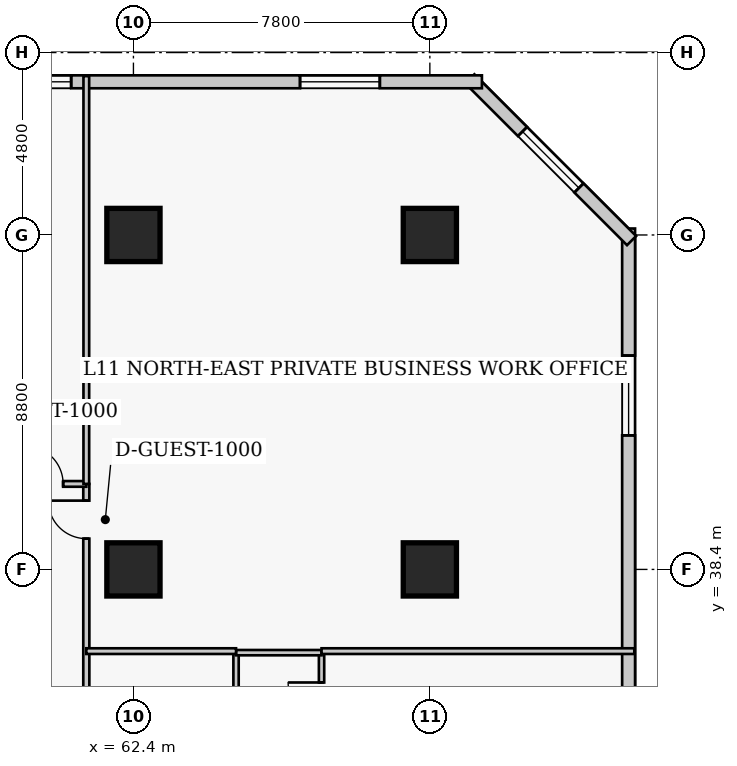
"""IFC4 building model, lengths in metres.
Left out: names, types, materials, properties, quantities, classifications, styles, units other than length and angle.
Written with IfcOpenShell. Run it as: python <this file> out.ifc"""

import sys

from ifc_helpers import new_model, si_unit, direction, frame, frame_2d, origin, origin_2d, place, context, subcontext, project, spatial, rectangle, extrude, element, fill, save


model = new_model("IFC4")
c1 = context("Model", 3, precision=1e-05, world=origin(), true_north=direction((0.0, 1.0)))
c2 = subcontext(c1, "Body", "Model", "MODEL_VIEW")
j1 = project(units=[si_unit("LENGTHUNIT", "METRE"), si_unit("PLANEANGLEUNIT", "RADIAN")], contexts=[c1])
p1 = place(None, origin())
s1 = spatial("IfcSite", under=j1, at=p1, CompositionType="ELEMENT")
p2 = place(p1, origin())
s2 = spatial("IfcBuilding", under=s1, at=p2, CompositionType="ELEMENT")
p3 = place(p2, frame((0.0, 0.0, 48.8)))
s3 = spatial("IfcBuildingStorey", under=s2, at=p3, CompositionType="ELEMENT", Elevation=48.8)
for number, where, z_axis, x_axis in (
    (1, (62.4, 38.4, 0.0), (0.0, 0.0, 1.0), (1.0, 0.0, 0.0)),
    (2, (62.4, 47.2, 0.0), (0.0, 0.0, 1.0), (1.0, 0.0, 0.0)),
    (3, (70.2, 38.4, 0.0), (0.0, 0.0, 1.0), (1.0, 0.0, 0.0)),
    (4, (70.2, 47.2, 0.0), (0.0, 0.0, 1.0), (1.0, 0.0, 0.0)),
):
    element("IfcColumn", number, at=place(p3, frame(where, z_axis=z_axis, x_axis=x_axis)), inside=s3, PredefinedType="COLUMN", context=c2, shape_type="SweptSolid", body=[
        extrude(rectangle(XDim=1.4, YDim=1.4, at=origin_2d()), origin(), (0.0, 0.0, 1.0), 3.8),
    ])
p4 = place(p3, frame((75.43, 12.23, 0.0), z_axis=(0.0, 0.0, 1.0), x_axis=(0.0, 1.0, 0.0)))
e5 = element("IfcWall", 5, at=p4, inside=s3, PredefinedType="SOLIDWALL", context=c2, shape_type="SweptSolid", body=[
    extrude(rectangle(XDim=35.14, YDim=0.34, at=frame_2d((17.57, 0.0))), origin(), (0.0, 0.0, 1.0), 3.54),
])
p5 = place(p4, frame((3.343, 0.0, 0.85)))
e6 = element("IfcOpeningElement", 6, at=p5, cuts=e5, PredefinedType="OPENING", context=c2, shape_type="SweptSolid", body=[
    extrude(rectangle(XDim=2.1, YDim=1.85, at=frame_2d((1.05, 0.925))), frame((0.0, 0.18, 0.0), z_axis=(0.0, -1.0, 0.0), x_axis=(1.0, 0.0, 0.0)), (0.0, 0.0, 1.0), 0.36),
])
p6 = place(p4, frame((12.127, 0.0, 0.85)))
e7 = element("IfcOpeningElement", 7, at=p6, cuts=e5, PredefinedType="OPENING", context=c2, shape_type="SweptSolid", body=[
    extrude(rectangle(XDim=2.1, YDim=1.85, at=frame_2d((1.05, 0.925))), frame((0.0, 0.18, 0.0), z_axis=(0.0, -1.0, 0.0), x_axis=(1.0, 0.0, 0.0)), (0.0, 0.0, 1.0), 0.36),
])
p7 = place(p4, frame((20.913, 0.0, 0.85)))
e8 = element("IfcOpeningElement", 8, at=p7, cuts=e5, PredefinedType="OPENING", context=c2, shape_type="SweptSolid", body=[
    extrude(rectangle(XDim=2.1, YDim=1.85, at=frame_2d((1.05, 0.925))), frame((0.0, 0.18, 0.0), z_axis=(0.0, -1.0, 0.0), x_axis=(1.0, 0.0, 0.0)), (0.0, 0.0, 1.0), 0.36),
])
p8 = place(p4, frame((29.698, 0.0, 0.85)))
e9 = element("IfcOpeningElement", 9, at=p8, cuts=e5, PredefinedType="OPENING", context=c2, shape_type="SweptSolid", body=[
    extrude(rectangle(XDim=2.1, YDim=1.85, at=frame_2d((1.05, 0.925))), frame((0.0, 0.18, 0.0), z_axis=(0.0, -1.0, 0.0), x_axis=(1.0, 0.0, 0.0)), (0.0, 0.0, 1.0), 0.36),
])
p9 = place(p3, frame((75.508, 47.052, 0.0), z_axis=(0.0, 0.0, 1.0), x_axis=(-0.707106781187, 0.707106781187, 0.0)))
e10 = element("IfcWall", 10, at=p9, inside=s3, PredefinedType="SOLIDWALL", context=c2, shape_type="SweptSolid", body=[
    extrude(rectangle(XDim=6.02, YDim=0.34, at=frame_2d((3.01, 0.0))), origin(), (0.0, 0.0, 1.0), 3.54),
])
p10 = place(p9, frame((1.96, 0.0, 0.85)))
e11 = element("IfcOpeningElement", 11, at=p10, cuts=e10, PredefinedType="OPENING", context=c2, shape_type="SweptSolid", body=[
    extrude(rectangle(XDim=2.1, YDim=1.85, at=frame_2d((1.05, 0.925))), frame((0.0, 0.18, 0.0), z_axis=(0.0, -1.0, 0.0), x_axis=(1.0, 0.0, 0.0)), (0.0, 0.0, 1.0), 0.36),
])
p11 = place(p3, frame((71.57, 51.23, 0.0), z_axis=(0.0, 0.0, 1.0), x_axis=(-1.0, 0.0, 0.0)))
e12 = element("IfcWall", 12, at=p11, inside=s3, PredefinedType="SOLIDWALL", context=c2, shape_type="SweptSolid", body=[
    extrude(rectangle(XDim=29.89, YDim=0.34, at=frame_2d((14.945, 0.0))), origin(), (0.0, 0.0, 1.0), 3.54),
])
p12 = place(p11, frame((2.686, 0.0, 0.85)))
e13 = element("IfcOpeningElement", 13, at=p12, cuts=e12, PredefinedType="OPENING", context=c2, shape_type="SweptSolid", body=[
    extrude(rectangle(XDim=2.1, YDim=1.85, at=frame_2d((1.05, 0.925))), frame((0.0, 0.18, 0.0), z_axis=(0.0, -1.0, 0.0), x_axis=(1.0, 0.0, 0.0)), (0.0, 0.0, 1.0), 0.36),
])
p13 = place(p11, frame((10.809, 0.0, 0.85)))
e14 = element("IfcOpeningElement", 14, at=p13, cuts=e12, PredefinedType="OPENING", context=c2, shape_type="SweptSolid", body=[
    extrude(rectangle(XDim=2.1, YDim=1.85, at=frame_2d((1.05, 0.925))), frame((0.0, 0.18, 0.0), z_axis=(0.0, -1.0, 0.0), x_axis=(1.0, 0.0, 0.0)), (0.0, 0.0, 1.0), 0.36),
])
p14 = place(p11, frame((17.631, 0.0, 0.85)))
e15 = element("IfcOpeningElement", 15, at=p14, cuts=e12, PredefinedType="OPENING", context=c2, shape_type="SweptSolid", body=[
    extrude(rectangle(XDim=2.1, YDim=1.85, at=frame_2d((1.05, 0.925))), frame((0.0, 0.18, 0.0), z_axis=(0.0, -1.0, 0.0), x_axis=(1.0, 0.0, 0.0)), (0.0, 0.0, 1.0), 0.36),
])
p15 = place(p11, frame((25.104, 0.0, 0.85)))
e16 = element("IfcOpeningElement", 16, at=p15, cuts=e12, PredefinedType="OPENING", context=c2, shape_type="SweptSolid", body=[
    extrude(rectangle(XDim=2.1, YDim=1.85, at=frame_2d((1.05, 0.925))), frame((0.0, 0.18, 0.0), z_axis=(0.0, -1.0, 0.0), x_axis=(1.0, 0.0, 0.0)), (0.0, 0.0, 1.0), 0.36),
])
p16 = place(p3, frame((61.16, 10.25, 0.0), z_axis=(0.0, 0.0, 1.0), x_axis=(0.0, 1.0, 0.0)))
e17 = element("IfcWall", 17, at=p16, inside=s3, PredefinedType="PARTITIONING", context=c2, shape_type="SweptSolid", body=[
    extrude(rectangle(XDim=30.4, YDim=0.16, at=frame_2d((15.2, 0.0))), origin(), (0.0, 0.0, 1.0), 3.54),
])
p17 = place(p16, frame((4.4, 0.0, 0.0)))
e18 = element("IfcOpeningElement", 18, at=p17, cuts=e17, PredefinedType="OPENING", context=c2, shape_type="SweptSolid", body=[
    extrude(rectangle(XDim=0.95, YDim=2.1, at=frame_2d((0.475, 1.05))), frame((0.0, 0.09, 0.0), z_axis=(0.0, -1.0, 0.0), x_axis=(1.0, 0.0, 0.0)), (0.0, 0.0, 1.0), 0.18),
])
p18 = place(p16, frame((13.675, 0.0, 0.0)))
e19 = element("IfcOpeningElement", 19, at=p18, cuts=e17, PredefinedType="OPENING", context=c2, shape_type="SweptSolid", body=[
    extrude(rectangle(XDim=0.95, YDim=2.1, at=frame_2d((0.475, 1.05))), frame((0.0, 0.09, 0.0), z_axis=(0.0, -1.0, 0.0), x_axis=(1.0, 0.0, 0.0)), (0.0, 0.0, 1.0), 0.18),
])
p19 = place(p16, frame((21.8, 0.0, 0.0)))
e20 = element("IfcOpeningElement", 20, at=p19, cuts=e17, PredefinedType="OPENING", context=c2, shape_type="SweptSolid", body=[
    extrude(rectangle(XDim=0.95, YDim=2.1, at=frame_2d((0.475, 1.05))), frame((0.0, 0.09, 0.0), z_axis=(0.0, -1.0, 0.0), x_axis=(1.0, 0.0, 0.0)), (0.0, 0.0, 1.0), 0.18),
])
p20 = place(p16, frame((28.96, 0.0, 0.0)))
e21 = element("IfcOpeningElement", 21, at=p20, cuts=e17, PredefinedType="OPENING", context=c2, shape_type="SweptSolid", body=[
    extrude(rectangle(XDim=1.0, YDim=2.15, at=frame_2d((0.5, 1.075))), frame((0.0, 0.09, 0.0), z_axis=(0.0, -1.0, 0.0), x_axis=(1.0, 0.0, 0.0)), (0.0, 0.0, 1.0), 0.18),
])
p21 = place(p3, frame((56.8, 40.65, 0.0), z_axis=(0.0, 0.0, 1.0), x_axis=(1.0, 0.0, 0.0)))
e22 = element("IfcWall", 22, at=p21, inside=s3, PredefinedType="PARTITIONING", context=c2, shape_type="SweptSolid", body=[
    extrude(rectangle(XDim=4.36, YDim=0.15, at=frame_2d((2.18, 0.0))), origin(), (0.0, 0.0, 1.0), 3.54),
])
p22 = place(p21, frame((2.75, 0.0, 0.0)))
e23 = element("IfcOpeningElement", 23, at=p22, cuts=e22, PredefinedType="OPENING", context=c2, shape_type="SweptSolid", body=[
    extrude(rectangle(XDim=1.0, YDim=2.15, at=frame_2d((0.5, 1.075))), frame((0.0, 0.085, 0.0), z_axis=(0.0, -1.0, 0.0), x_axis=(1.0, 0.0, 0.0)), (0.0, 0.0, 1.0), 0.17),
])
p23 = place(p3, frame((61.16, 40.65, 0.0), z_axis=(0.0, 0.0, 1.0), x_axis=(0.0, 1.0, 0.0)))
e24 = element("IfcWall", 24, at=p23, inside=s3, PredefinedType="PARTITIONING", context=c2, shape_type="SweptSolid", body=[
    extrude(rectangle(XDim=10.73, YDim=0.15, at=frame_2d((5.365, 0.0))), origin(), (0.0, 0.0, 1.0), 3.54),
])
p24 = place(p3, frame((65.1, 33.76, 0.0), z_axis=(0.0, 0.0, 1.0), x_axis=(0.0, 1.0, 0.0)))
e25 = element("IfcWall", 25, at=p24, inside=s3, PredefinedType="PLUMBINGWALL", context=c2, shape_type="SweptSolid", body=[
    extrude(rectangle(XDim=2.45, YDim=0.14, at=frame_2d((1.225, 0.0))), origin(), (0.0, 0.0, 1.0), 3.54),
])
p25 = place(p3, frame((67.35, 33.76, 0.0), z_axis=(0.0, 0.0, 1.0), x_axis=(0.0, 1.0, 0.0)))
e26 = element("IfcWall", 26, at=p25, inside=s3, PredefinedType="PLUMBINGWALL", context=c2, shape_type="SweptSolid", body=[
    extrude(rectangle(XDim=2.45, YDim=0.14, at=frame_2d((1.225, 0.0))), origin(), (0.0, 0.0, 1.0), 3.54),
])
p26 = place(p25, frame((0.785, 0.0, 0.0)))
e27 = element("IfcOpeningElement", 27, at=p26, cuts=e26, PredefinedType="OPENING", context=c2, shape_type="SweptSolid", body=[
    extrude(rectangle(XDim=0.88, YDim=2.05, at=frame_2d((0.44, 1.025))), frame((0.0, 0.08, 0.0), z_axis=(0.0, -1.0, 0.0), x_axis=(1.0, 0.0, 0.0)), (0.0, 0.0, 1.0), 0.16),
])
p27 = place(p3, frame((65.1, 36.21, 0.0), z_axis=(0.0, 0.0, 1.0), x_axis=(1.0, 0.0, 0.0)))
e28 = element("IfcWall", 28, at=p27, inside=s3, PredefinedType="PLUMBINGWALL", context=c2, shape_type="SweptSolid", body=[
    extrude(rectangle(XDim=2.25, YDim=0.14, at=frame_2d((1.125, 0.0))), origin(), (0.0, 0.0, 1.0), 3.54),
])
p28 = place(p3, frame((61.16, 36.25, 0.0), z_axis=(0.0, 0.0, 1.0), x_axis=(1.0, 0.0, 0.0)))
e29 = element("IfcWall", 29, at=p28, inside=s3, PredefinedType="PARTITIONING", context=c2, shape_type="SweptSolid", body=[
    extrude(rectangle(XDim=3.94, YDim=0.15, at=frame_2d((1.97, 0.0))), origin(), (0.0, 0.0, 1.0), 3.54),
])
p29 = place(p3, frame((67.35, 36.25, 0.0), z_axis=(0.0, 0.0, 1.0), x_axis=(1.0, 0.0, 0.0)))
e30 = element("IfcWall", 30, at=p29, inside=s3, PredefinedType="PARTITIONING", context=c2, shape_type="SweptSolid", body=[
    extrude(rectangle(XDim=8.23, YDim=0.15, at=frame_2d((4.115, 0.0))), origin(), (0.0, 0.0, 1.0), 3.54),
])
p30 = place(p8, origin())
e31 = element("IfcWindow", 31, at=p30, inside=s3, PartitioningType="SINGLE_PANEL", PredefinedType="WINDOW", context=c2, shape_type="SweptSolid", body=[
    extrude(rectangle(XDim=2.1, YDim=1.85, at=frame_2d((1.05, 0.925))), frame((0.0, 0.03, 0.0), z_axis=(0.0, -1.0, 0.0), x_axis=(1.0, 0.0, 0.0)), (0.0, 0.0, 1.0), 0.06),
])
fill(e9, e31)
p31 = place(p10, origin())
e32 = element("IfcWindow", 32, at=p31, inside=s3, PartitioningType="SINGLE_PANEL", PredefinedType="WINDOW", context=c2, shape_type="SweptSolid", body=[
    extrude(rectangle(XDim=2.1, YDim=1.85, at=frame_2d((1.05, 0.925))), frame((0.0, 0.03, 0.0), z_axis=(0.0, -1.0, 0.0), x_axis=(1.0, 0.0, 0.0)), (0.0, 0.0, 1.0), 0.06),
])
fill(e11, e32)
p32 = place(p12, origin())
e33 = element("IfcWindow", 33, at=p32, inside=s3, PartitioningType="SINGLE_PANEL", PredefinedType="WINDOW", context=c2, shape_type="SweptSolid", body=[
    extrude(rectangle(XDim=2.1, YDim=1.85, at=frame_2d((1.05, 0.925))), frame((0.0, 0.03, 0.0), z_axis=(0.0, -1.0, 0.0), x_axis=(1.0, 0.0, 0.0)), (0.0, 0.0, 1.0), 0.06),
])
fill(e13, e33)
p33 = place(p13, origin())
e34 = element("IfcWindow", 34, at=p33, inside=s3, PartitioningType="SINGLE_PANEL", PredefinedType="WINDOW", context=c2, shape_type="SweptSolid", body=[
    extrude(rectangle(XDim=2.1, YDim=1.85, at=frame_2d((1.05, 0.925))), frame((0.0, 0.03, 0.0), z_axis=(0.0, -1.0, 0.0), x_axis=(1.0, 0.0, 0.0)), (0.0, 0.0, 1.0), 0.06),
])
fill(e14, e34)
p34 = place(p22, origin())
e35 = element("IfcDoor", 35, at=p34, inside=s3, OperationType="SINGLE_SWING_LEFT", PredefinedType="DOOR", context=c2, shape_type="SweptSolid", body=[
    extrude(rectangle(XDim=1.0, YDim=2.15, at=frame_2d((0.5, 1.075))), frame((0.0, 0.025, 0.0), z_axis=(0.0, -1.0, 0.0), x_axis=(1.0, 0.0, 0.0)), (0.0, 0.0, 1.0), 0.05),
])
fill(e23, e35)
p35 = place(p26, origin())
e36 = element("IfcDoor", 36, at=p35, inside=s3, OperationType="SINGLE_SWING_RIGHT", PredefinedType="DOOR", context=c2, shape_type="SweptSolid", body=[
    extrude(rectangle(XDim=0.88, YDim=2.05, at=frame_2d((0.44, 1.025))), frame((0.0, 0.025, 0.0), z_axis=(0.0, -1.0, 0.0), x_axis=(1.0, 0.0, 0.0)), (0.0, 0.0, 1.0), 0.05),
])
fill(e27, e36)
p36 = place(p20, origin())
e37 = element("IfcDoor", 37, at=p36, inside=s3, OperationType="SINGLE_SWING_RIGHT", PredefinedType="DOOR", context=c2, shape_type="SweptSolid", body=[
    extrude(rectangle(XDim=1.0, YDim=2.15, at=frame_2d((0.5, 1.075))), frame((0.0, 0.025, 0.0), z_axis=(0.0, -1.0, 0.0), x_axis=(1.0, 0.0, 0.0)), (0.0, 0.0, 1.0), 0.05),
])
fill(e21, e37)
save(model, sys.argv[1])
